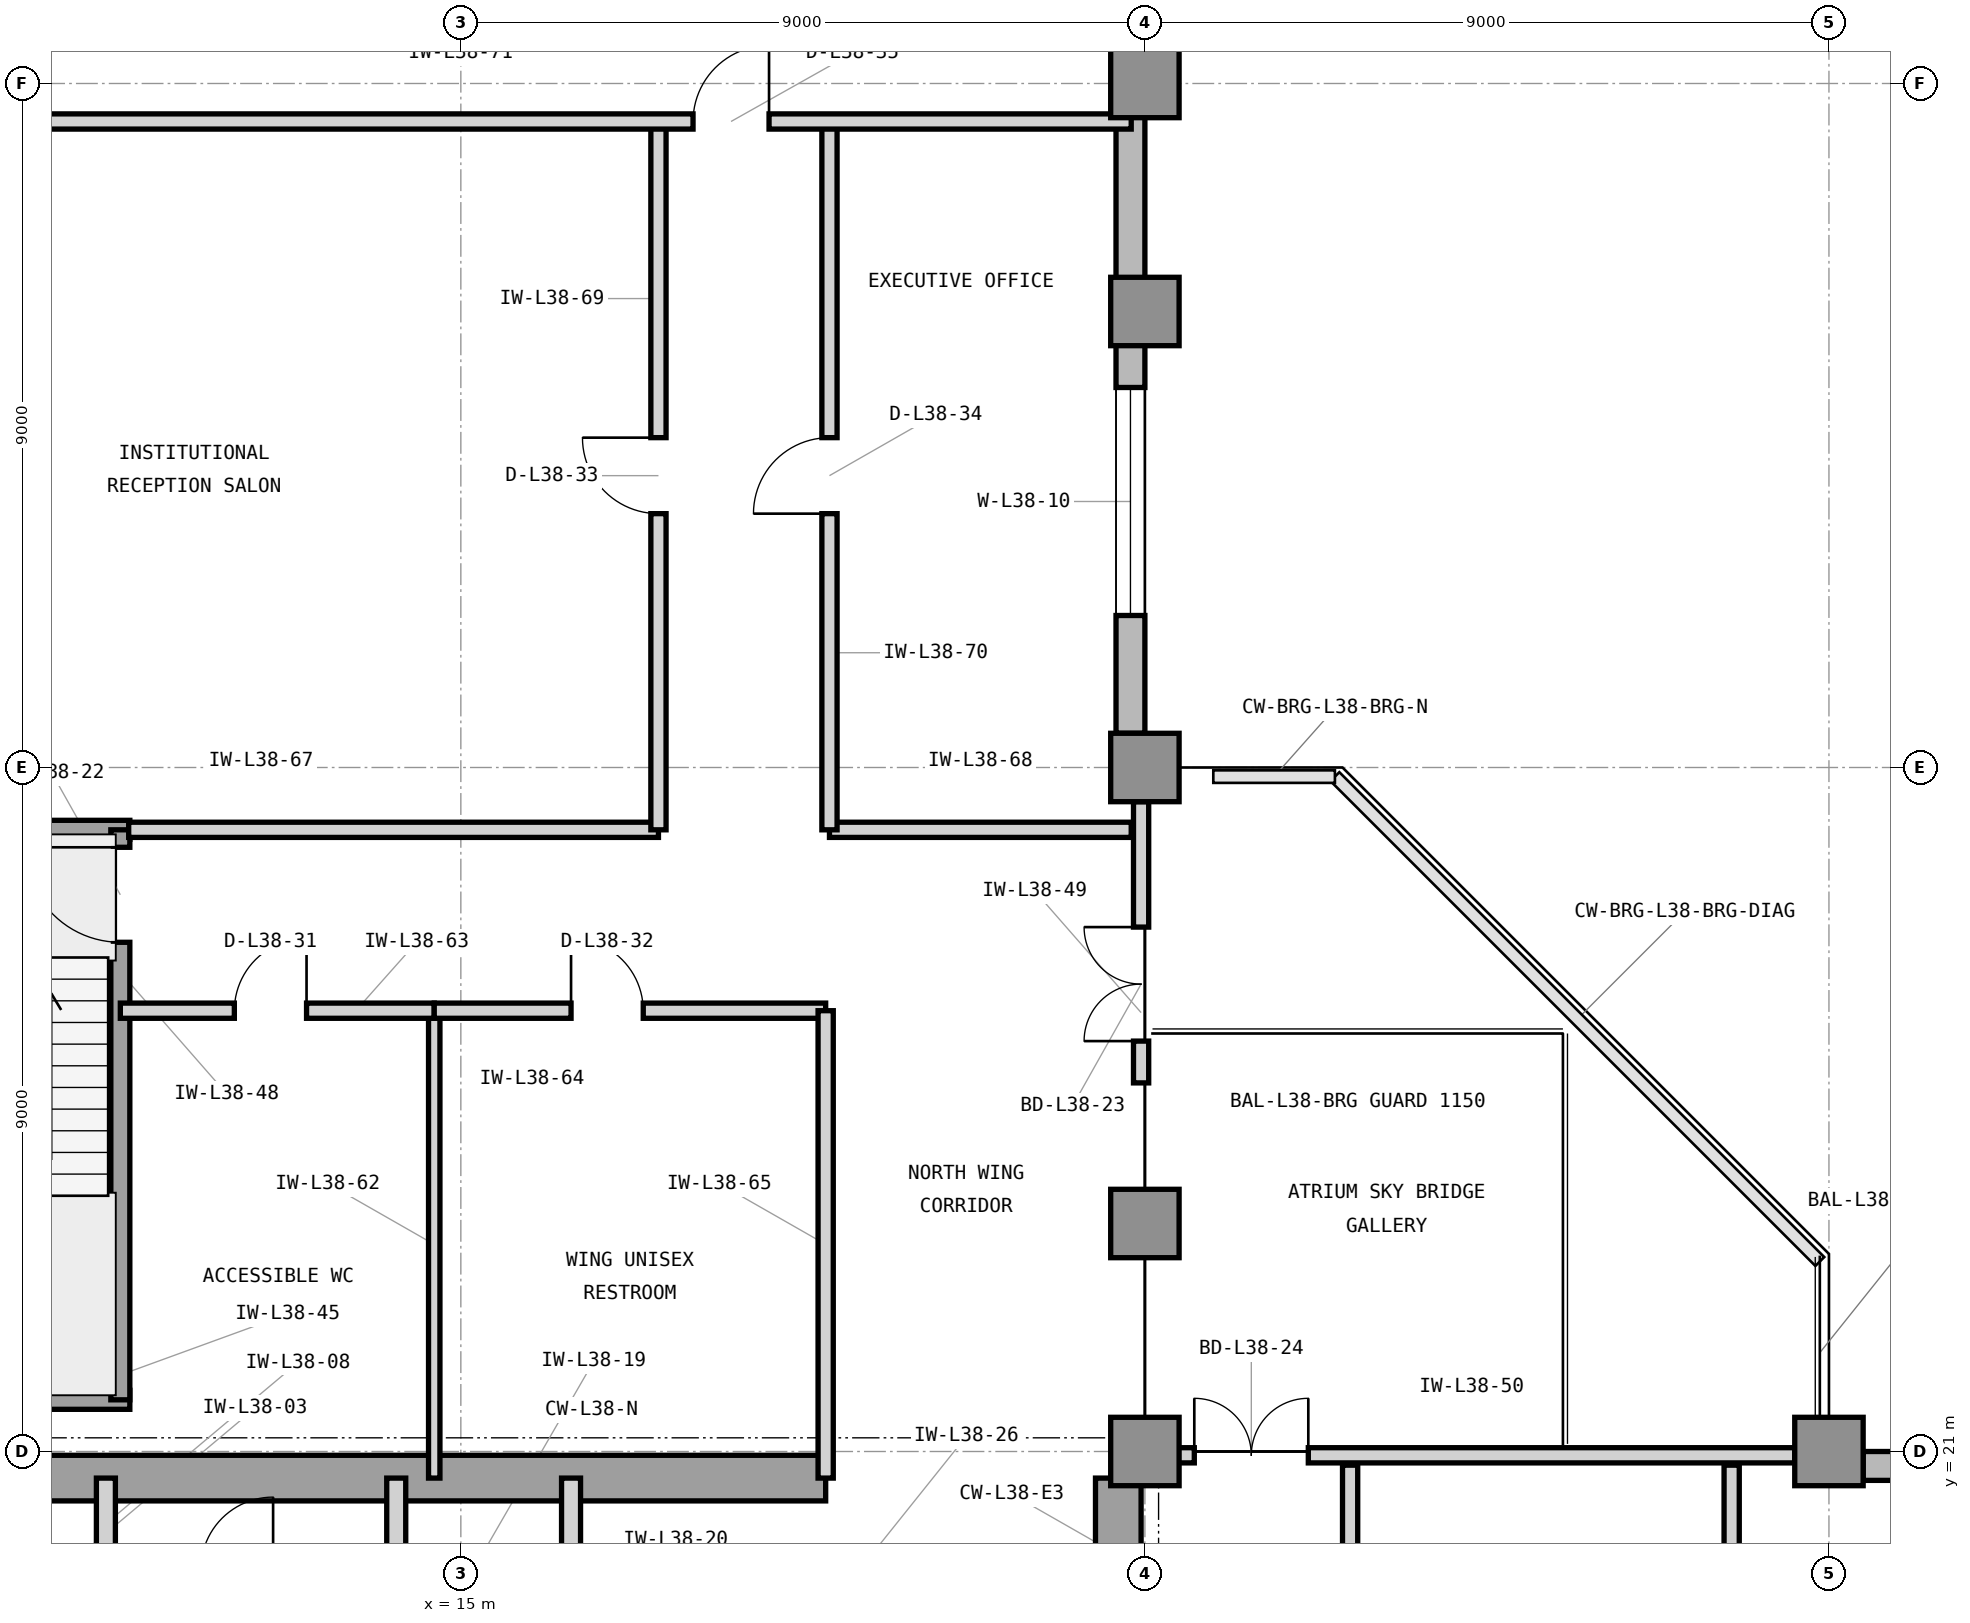
"""IFC4 building model, lengths in metres.
Left out: names, types, materials, properties, quantities, classifications, styles, units other than length and angle.
Written with IfcOpenShell. Run it as: python <this file> out.ifc"""

import sys

from ifc_helpers import new_model, si_unit, direction, frame, frame_2d, origin, origin_2d, place, context, subcontext, project, spatial, rectangle, extrude, element, fill, save


model = new_model("IFC4")
c1 = context("Model", 3, precision=1e-05, world=origin(), true_north=direction((0.0, 1.0)))
c2 = subcontext(c1, "Body", "Model", "MODEL_VIEW")
j1 = project(units=[si_unit("LENGTHUNIT", "METRE"), si_unit("PLANEANGLEUNIT", "RADIAN")], contexts=[c1])
p1 = place(None, origin())
s1 = spatial("IfcSite", under=j1, at=p1, CompositionType="ELEMENT")
p2 = place(p1, origin())
s2 = spatial("IfcBuilding", under=s1, at=p2, CompositionType="ELEMENT")
p3 = place(p2, frame((0.0, 0.0, 160.2)))
s3 = spatial("IfcBuildingStorey", under=s2, at=p3, CompositionType="ELEMENT", Elevation=160.2)
p4 = place(p3, frame((7.475, 20.65, 0.0), z_axis=(0.0, 0.0, 1.0), x_axis=(1.0, 0.0, 0.0)))
e1 = element("IfcWall", 1, at=p4, inside=s3, PredefinedType="SHEAR", context=c2, shape_type="SweptSolid", body=[
    extrude(rectangle(XDim=12.325, YDim=0.6, at=frame_2d((6.163, 0.0))), origin(), (0.0, 0.0, 1.0), 4.2),
])
p5 = place(p3, frame((23.65, 16.6, 0.0), z_axis=(0.0, 0.0, 1.0), x_axis=(0.0, 1.0, 0.0)))
e2 = element("IfcWall", 2, at=p5, inside=s3, PredefinedType="SHEAR", context=c2, shape_type="SweptSolid", body=[
    extrude(rectangle(XDim=4.05, YDim=0.6, at=frame_2d((2.025, 0.0))), origin(), (0.0, 0.0, 1.0), 4.2),
])
for number, where, z_axis, x_axis in (
    (3, (24.0, 21.0, 0.0), (0.0, 0.0, 1.0), (1.0, 0.0, 0.0)),
    (4, (33.0, 21.0, 0.0), (0.0, 0.0, 1.0), (1.0, 0.0, 0.0)),
    (5, (24.0, 24.0, 0.0), (0.0, 0.0, 1.0), (1.0, 0.0, 0.0)),
    (6, (24.0, 30.0, 0.0), (0.0, 0.0, 1.0), (1.0, 0.0, 0.0)),
    (7, (24.0, 36.0, 0.0), (0.0, 0.0, 1.0), (1.0, 0.0, 0.0)),
    (8, (24.0, 39.0, 0.0), (0.0, 0.0, 1.0), (1.0, 0.0, 0.0)),
):
    element("IfcColumn", number, at=place(p3, frame(where, z_axis=z_axis, x_axis=x_axis)), inside=s3, PredefinedType="COLUMN", context=c2, shape_type="SweptSolid", body=[
        extrude(rectangle(XDim=0.9, YDim=0.9, at=origin_2d()), origin(), (0.0, 0.0, 1.0), 4.2),
    ])
p6 = place(p3, frame((55.4, 20.81, 0.0), z_axis=(0.0, 0.0, 1.0), x_axis=(-1.0, 0.0, 0.0)))
e9 = element("IfcWall", 9, at=p6, inside=s3, PredefinedType="STANDARD", context=c2, shape_type="SweptSolid", body=[
    extrude(rectangle(XDim=21.95, YDim=0.38, at=frame_2d((10.975, 0.0))), origin(), (0.0, 0.0, 1.0), 4.0),
])
p7 = place(p6, frame((18.306, 0.0, 0.85)))
e10 = element("IfcOpeningElement", 10, at=p7, cuts=e9, PredefinedType="OPENING", context=c2, shape_type="SweptSolid", body=[
    extrude(rectangle(XDim=1.8, YDim=2.25, at=frame_2d((0.9, 1.125))), frame((0.0, 0.2, 0.0), z_axis=(0.0, -1.0, 0.0), x_axis=(1.0, 0.0, 0.0)), (0.0, 0.0, 1.0), 0.4),
])
p8 = place(p6, frame((9.404, 0.0, 0.7)))
e11 = element("IfcOpeningElement", 11, at=p8, cuts=e9, PredefinedType="OPENING", context=c2, shape_type="SweptSolid", body=[
    extrude(rectangle(XDim=3.0, YDim=2.6, at=frame_2d((1.5, 1.3))), frame((0.0, 0.2, 0.0), z_axis=(0.0, -1.0, 0.0), x_axis=(1.0, 0.0, 0.0)), (0.0, 0.0, 1.0), 0.4),
])
p9 = place(p3, frame((23.81, 30.45, 0.0), z_axis=(0.0, 0.0, 1.0), x_axis=(0.0, 1.0, 0.0)))
e12 = element("IfcWall", 12, at=p9, inside=s3, PredefinedType="STANDARD", context=c2, shape_type="SweptSolid", body=[
    extrude(rectangle(XDim=12.95, YDim=0.38, at=frame_2d((6.475, 0.0))), origin(), (0.0, 0.0, 1.0), 4.0),
])
p10 = place(p9, frame((1.55, 0.0, 0.7)))
e13 = element("IfcOpeningElement", 13, at=p10, cuts=e12, PredefinedType="OPENING", context=c2, shape_type="SweptSolid", body=[
    extrude(rectangle(XDim=3.0, YDim=2.6, at=frame_2d((1.5, 1.3))), frame((0.0, 0.2, 0.0), z_axis=(0.0, -1.0, 0.0), x_axis=(1.0, 0.0, 0.0)), (0.0, 0.0, 1.0), 0.4),
])
p11 = place(p3, frame((10.33, 19.45, 0.0), z_axis=(0.0, 0.0, 1.0), x_axis=(0.0, 1.0, 0.0)))
e14 = element("IfcWall", 14, at=p11, inside=s3, PredefinedType="PARTITIONING", context=c2, shape_type="SweptSolid", body=[
    extrude(rectangle(XDim=1.2, YDim=0.25, at=frame_2d((0.6, 0.0))), origin(), (0.0, 0.0, 1.0), 3.373),
])
for number, where, z_axis, x_axis in (
    (15, (14.15, 16.7, 0.0), (0.0, 0.0, 1.0), (0.0, 1.0, 0.0)),
    (16, (16.45, 16.7, 0.0), (0.0, 0.0, 1.0), (0.0, 1.0, 0.0)),
):
    element("IfcWall", number, at=place(p3, frame(where, z_axis=z_axis, x_axis=x_axis)), inside=s3, PredefinedType="PARTITIONING", context=c2, shape_type="SweptSolid", body=[
        extrude(rectangle(XDim=3.95, YDim=0.25, at=frame_2d((1.975, 0.0))), origin(), (0.0, 0.0, 1.0), 3.93),
    ])
for number, where, z_axis, x_axis in (
    (17, (6.555, 21.68, 0.0), (0.0, 0.0, 1.0), (1.0, 0.0, 0.0)),
    (18, (6.555, 29.18, 0.0), (0.0, 0.0, 1.0), (1.0, 0.0, 0.0)),
):
    element("IfcWall", number, at=place(p3, frame(where, z_axis=z_axis, x_axis=x_axis)), inside=s3, PredefinedType="SHEAR", context=c2, shape_type="SweptSolid", body=[
        extrude(rectangle(XDim=4.09, YDim=0.25, at=frame_2d((2.045, 0.0))), origin(), (0.0, 0.0, 1.0), 4.2),
    ])
p12 = place(p3, frame((10.52, 21.68, 0.0), z_axis=(0.0, 0.0, 1.0), x_axis=(0.0, 1.0, 0.0)))
e19 = element("IfcWall", 19, at=p12, inside=s3, PredefinedType="SHEAR", context=c2, shape_type="SweptSolid", body=[
    extrude(rectangle(XDim=7.5, YDim=0.25, at=frame_2d((3.75, 0.0))), origin(), (0.0, 0.0, 1.0), 4.2),
])
p13 = place(p12, frame((6.02, 0.0, 0.0)))
e20 = element("IfcOpeningElement", 20, at=p13, cuts=e19, PredefinedType="OPENING", context=c2, shape_type="SweptSolid", body=[
    extrude(rectangle(XDim=1.25, YDim=2.2, at=frame_2d((0.625, 1.1))), frame((0.0, 0.135, 0.0), z_axis=(0.0, -1.0, 0.0), x_axis=(1.0, 0.0, 0.0)), (0.0, 0.0, 1.0), 0.27),
])
p14 = place(p3, frame((23.95, 25.85, 0.0), z_axis=(0.0, 0.0, 1.0), x_axis=(0.0, 1.0, 0.0)))
e21 = element("IfcWall", 21, at=p14, inside=s3, PredefinedType="PARTITIONING", context=c2, shape_type="SweptSolid", body=[
    extrude(rectangle(XDim=3.7, YDim=0.2, at=frame_2d((1.85, 0.0))), origin(), (0.0, 0.0, 1.0), 3.386),
])
p15 = place(p14, frame((0.55, 0.0, 0.0)))
e22 = element("IfcOpeningElement", 22, at=p15, cuts=e21, PredefinedType="OPENING", context=c2, shape_type="SweptSolid", body=[
    extrude(rectangle(XDim=1.5, YDim=2.3, at=frame_2d((0.75, 1.15))), frame((0.0, 0.11, 0.0), z_axis=(0.0, -1.0, 0.0), x_axis=(1.0, 0.0, 0.0)), (0.0, 0.0, 1.0), 0.22),
])
p16 = place(p3, frame((24.05, 20.95, 0.0), z_axis=(0.0, 0.0, 1.0), x_axis=(1.0, 0.0, 0.0)))
e23 = element("IfcWall", 23, at=p16, inside=s3, PredefinedType="PARTITIONING", context=c2, shape_type="SweptSolid", body=[
    extrude(rectangle(XDim=8.5, YDim=0.2, at=frame_2d((4.25, 0.0))), origin(), (0.0, 0.0, 1.0), 3.386),
])
p17 = place(p16, frame((0.6, 0.0, 0.0)))
e24 = element("IfcOpeningElement", 24, at=p17, cuts=e23, PredefinedType="OPENING", context=c2, shape_type="SweptSolid", body=[
    extrude(rectangle(XDim=1.5, YDim=2.3, at=frame_2d((0.75, 1.15))), frame((0.0, 0.11, 0.0), z_axis=(0.0, -1.0, 0.0), x_axis=(1.0, 0.0, 0.0)), (0.0, 0.0, 1.0), 0.22),
])
for number, where, z_axis, x_axis in (
    (25, (26.7, 12.4, 0.0), (0.0, 0.0, 1.0), (0.0, 1.0, 0.0)),
    (26, (31.72, 12.4, 0.0), (0.0, 0.0, 1.0), (0.0, 1.0, 0.0)),
):
    element("IfcWall", number, at=place(p3, frame(where, z_axis=z_axis, x_axis=x_axis)), inside=s3, PredefinedType="PARTITIONING", context=c2, shape_type="SweptSolid", body=[
        extrude(rectangle(XDim=8.42, YDim=0.2, at=frame_2d((4.21, 0.0))), origin(), (0.0, 0.0, 1.0), 3.93),
    ])
p18 = place(p3, frame((14.65, 20.65, 0.0), z_axis=(0.0, 0.0, 1.0), x_axis=(0.0, 1.0, 0.0)))
e27 = element("IfcWall", 27, at=p18, inside=s3, PredefinedType="PARTITIONING", context=c2, shape_type="SweptSolid", body=[
    extrude(rectangle(XDim=6.15, YDim=0.15, at=frame_2d((3.075, 0.0))), origin(), (0.0, 0.0, 1.0), 3.93),
])
p19 = place(p3, frame((10.52, 26.8, 0.0), z_axis=(0.0, 0.0, 1.0), x_axis=(1.0, 0.0, 0.0)))
e28 = element("IfcWall", 28, at=p19, inside=s3, PredefinedType="PARTITIONING", context=c2, shape_type="SweptSolid", body=[
    extrude(rectangle(XDim=4.13, YDim=0.2, at=frame_2d((2.065, 0.0))), origin(), (0.0, 0.0, 1.0), 3.93),
])
p20 = place(p19, frame((1.5, 0.0, 0.0)))
e29 = element("IfcOpeningElement", 29, at=p20, cuts=e28, PredefinedType="OPENING", context=c2, shape_type="SweptSolid", body=[
    extrude(rectangle(XDim=0.95, YDim=2.1, at=frame_2d((0.475, 1.05))), frame((0.0, 0.11, 0.0), z_axis=(0.0, -1.0, 0.0), x_axis=(1.0, 0.0, 0.0)), (0.0, 0.0, 1.0), 0.22),
])
p21 = place(p3, frame((14.65, 26.8, 0.0), z_axis=(0.0, 0.0, 1.0), x_axis=(1.0, 0.0, 0.0)))
e30 = element("IfcWall", 30, at=p21, inside=s3, PredefinedType="PARTITIONING", context=c2, shape_type="SweptSolid", body=[
    extrude(rectangle(XDim=5.15, YDim=0.2, at=frame_2d((2.575, 0.0))), origin(), (0.0, 0.0, 1.0), 3.93),
])
p22 = place(p21, frame((1.8, 0.0, 0.0)))
e31 = element("IfcOpeningElement", 31, at=p22, cuts=e30, PredefinedType="OPENING", context=c2, shape_type="SweptSolid", body=[
    extrude(rectangle(XDim=0.95, YDim=2.1, at=frame_2d((0.475, 1.05))), frame((0.0, 0.11, 0.0), z_axis=(0.0, -1.0, 0.0), x_axis=(1.0, 0.0, 0.0)), (0.0, 0.0, 1.0), 0.22),
])
p23 = place(p3, frame((19.8, 20.65, 0.0), z_axis=(0.0, 0.0, 1.0), x_axis=(0.0, 1.0, 0.0)))
e32 = element("IfcWall", 32, at=p23, inside=s3, PredefinedType="PARTITIONING", context=c2, shape_type="SweptSolid", body=[
    extrude(rectangle(XDim=6.15, YDim=0.2, at=frame_2d((3.075, 0.0))), origin(), (0.0, 0.0, 1.0), 3.93),
])
p24 = place(p3, frame((10.63, 29.18, 0.0), z_axis=(0.0, 0.0, 1.0), x_axis=(1.0, 0.0, 0.0)))
e33 = element("IfcWall", 33, at=p24, inside=s3, PredefinedType="PARTITIONING", context=c2, shape_type="SweptSolid", body=[
    extrude(rectangle(XDim=6.97, YDim=0.2, at=frame_2d((3.485, 0.0))), origin(), (0.0, 0.0, 1.0), 3.93),
])
p25 = place(p3, frame((19.85, 29.18, 0.0), z_axis=(0.0, 0.0, 1.0), x_axis=(1.0, 0.0, 0.0)))
e34 = element("IfcWall", 34, at=p25, inside=s3, PredefinedType="PARTITIONING", context=c2, shape_type="SweptSolid", body=[
    extrude(rectangle(XDim=3.97, YDim=0.2, at=frame_2d((1.985, 0.0))), origin(), (0.0, 0.0, 1.0), 3.93),
])
p26 = place(p3, frame((17.6, 29.18, 0.0), z_axis=(0.0, 0.0, 1.0), x_axis=(0.0, 1.0, 0.0)))
e35 = element("IfcWall", 35, at=p26, inside=s3, PredefinedType="PARTITIONING", context=c2, shape_type="SweptSolid", body=[
    extrude(rectangle(XDim=9.32, YDim=0.2, at=frame_2d((4.66, 0.0))), origin(), (0.0, 0.0, 1.0), 3.93),
])
p27 = place(p26, frame((4.16, 0.0, 0.0)))
e36 = element("IfcOpeningElement", 36, at=p27, cuts=e35, PredefinedType="OPENING", context=c2, shape_type="SweptSolid", body=[
    extrude(rectangle(XDim=1.0, YDim=2.15, at=frame_2d((0.5, 1.075))), frame((0.0, 0.11, 0.0), z_axis=(0.0, -1.0, 0.0), x_axis=(1.0, 0.0, 0.0)), (0.0, 0.0, 1.0), 0.22),
])
p28 = place(p3, frame((19.85, 29.18, 0.0), z_axis=(0.0, 0.0, 1.0), x_axis=(0.0, 1.0, 0.0)))
e37 = element("IfcWall", 37, at=p28, inside=s3, PredefinedType="PARTITIONING", context=c2, shape_type="SweptSolid", body=[
    extrude(rectangle(XDim=9.32, YDim=0.2, at=frame_2d((4.66, 0.0))), origin(), (0.0, 0.0, 1.0), 3.93),
])
p29 = place(p28, frame((4.16, 0.0, 0.0)))
e38 = element("IfcOpeningElement", 38, at=p29, cuts=e37, PredefinedType="OPENING", context=c2, shape_type="SweptSolid", body=[
    extrude(rectangle(XDim=1.0, YDim=2.15, at=frame_2d((0.5, 1.075))), frame((0.0, 0.11, 0.0), z_axis=(0.0, -1.0, 0.0), x_axis=(1.0, 0.0, 0.0)), (0.0, 0.0, 1.0), 0.22),
])
p30 = place(p3, frame((6.18, 38.5, 0.0), z_axis=(0.0, 0.0, 1.0), x_axis=(1.0, 0.0, 0.0)))
e39 = element("IfcWall", 39, at=p30, inside=s3, PredefinedType="PARTITIONING", context=c2, shape_type="SweptSolid", body=[
    extrude(rectangle(XDim=17.64, YDim=0.2, at=frame_2d((8.82, 0.0))), origin(), (0.0, 0.0, 1.0), 3.93),
])
p31 = place(p30, frame((11.875, 0.0, 0.0)))
e40 = element("IfcOpeningElement", 40, at=p31, cuts=e39, PredefinedType="OPENING", context=c2, shape_type="SweptSolid", body=[
    extrude(rectangle(XDim=1.0, YDim=2.15, at=frame_2d((0.5, 1.075))), frame((0.0, 0.11, 0.0), z_axis=(0.0, -1.0, 0.0), x_axis=(1.0, 0.0, 0.0)), (0.0, 0.0, 1.0), 0.22),
])
p32 = place(p13, origin())
e41 = element("IfcDoor", 41, at=p32, inside=s3, OperationType="SINGLE_SWING_RIGHT", PredefinedType="DOOR", context=c2, shape_type="SweptSolid", body=[
    extrude(rectangle(XDim=1.25, YDim=2.2, at=frame_2d((0.625, 1.1))), frame((0.0, 0.025, 0.0), z_axis=(0.0, -1.0, 0.0), x_axis=(1.0, 0.0, 0.0)), (0.0, 0.0, 1.0), 0.05),
])
fill(e20, e41)
p33 = place(p15, origin())
e42 = element("IfcDoor", 42, at=p33, inside=s3, OperationType="DOUBLE_DOOR_SINGLE_SWING", PredefinedType="DOOR", context=c2, shape_type="SweptSolid", body=[
    extrude(rectangle(XDim=1.5, YDim=2.3, at=frame_2d((0.75, 1.15))), frame((0.0, 0.025, 0.0), z_axis=(0.0, -1.0, 0.0), x_axis=(1.0, 0.0, 0.0)), (0.0, 0.0, 1.0), 0.05),
])
fill(e22, e42)
p34 = place(p17, origin())
e43 = element("IfcDoor", 43, at=p34, inside=s3, OperationType="DOUBLE_DOOR_SINGLE_SWING", PredefinedType="DOOR", context=c2, shape_type="SweptSolid", body=[
    extrude(rectangle(XDim=1.5, YDim=2.3, at=frame_2d((0.75, 1.15))), frame((0.0, 0.025, 0.0), z_axis=(0.0, -1.0, 0.0), x_axis=(1.0, 0.0, 0.0)), (0.0, 0.0, 1.0), 0.05),
])
fill(e24, e43)
p35 = place(p20, origin())
e44 = element("IfcDoor", 44, at=p35, inside=s3, OperationType="SINGLE_SWING_RIGHT", PredefinedType="DOOR", context=c2, shape_type="SweptSolid", body=[
    extrude(rectangle(XDim=0.95, YDim=2.1, at=frame_2d((0.475, 1.05))), frame((0.0, 0.025, 0.0), z_axis=(0.0, -1.0, 0.0), x_axis=(1.0, 0.0, 0.0)), (0.0, 0.0, 1.0), 0.05),
])
fill(e29, e44)
p36 = place(p22, origin())
e45 = element("IfcDoor", 45, at=p36, inside=s3, OperationType="SINGLE_SWING_LEFT", PredefinedType="DOOR", context=c2, shape_type="SweptSolid", body=[
    extrude(rectangle(XDim=0.95, YDim=2.1, at=frame_2d((0.475, 1.05))), frame((0.0, 0.025, 0.0), z_axis=(0.0, -1.0, 0.0), x_axis=(1.0, 0.0, 0.0)), (0.0, 0.0, 1.0), 0.05),
])
fill(e31, e45)
p37 = place(p27, origin())
e46 = element("IfcDoor", 46, at=p37, inside=s3, OperationType="SINGLE_SWING_RIGHT", PredefinedType="DOOR", context=c2, shape_type="SweptSolid", body=[
    extrude(rectangle(XDim=1.0, YDim=2.15, at=frame_2d((0.5, 1.075))), frame((0.0, 0.025, 0.0), z_axis=(0.0, -1.0, 0.0), x_axis=(1.0, 0.0, 0.0)), (0.0, 0.0, 1.0), 0.05),
])
fill(e36, e46)
p38 = place(p29, origin())
e47 = element("IfcDoor", 47, at=p38, inside=s3, OperationType="SINGLE_SWING_LEFT", PredefinedType="DOOR", context=c2, shape_type="SweptSolid", body=[
    extrude(rectangle(XDim=1.0, YDim=2.15, at=frame_2d((0.5, 1.075))), frame((0.0, 0.025, 0.0), z_axis=(0.0, -1.0, 0.0), x_axis=(1.0, 0.0, 0.0)), (0.0, 0.0, 1.0), 0.05),
])
fill(e38, e47)
p39 = place(p31, origin())
e48 = element("IfcDoor", 48, at=p39, inside=s3, OperationType="SINGLE_SWING_RIGHT", PredefinedType="DOOR", context=c2, shape_type="SweptSolid", body=[
    extrude(rectangle(XDim=1.0, YDim=2.15, at=frame_2d((0.5, 1.075))), frame((0.0, 0.025, 0.0), z_axis=(0.0, -1.0, 0.0), x_axis=(1.0, 0.0, 0.0)), (0.0, 0.0, 1.0), 0.05),
])
fill(e40, e48)
p40 = place(p10, origin())
e49 = element("IfcWindow", 49, at=p40, inside=s3, PartitioningType="SINGLE_PANEL", PredefinedType="WINDOW", context=c2, shape_type="SweptSolid", body=[
    extrude(rectangle(XDim=3.0, YDim=2.6, at=frame_2d((1.5, 1.3))), frame((0.0, 0.11, 0.0), z_axis=(0.0, -1.0, 0.0), x_axis=(1.0, 0.0, 0.0)), (0.0, 0.0, 1.0), 0.06),
])
fill(e13, e49)
save(model, sys.argv[1])
